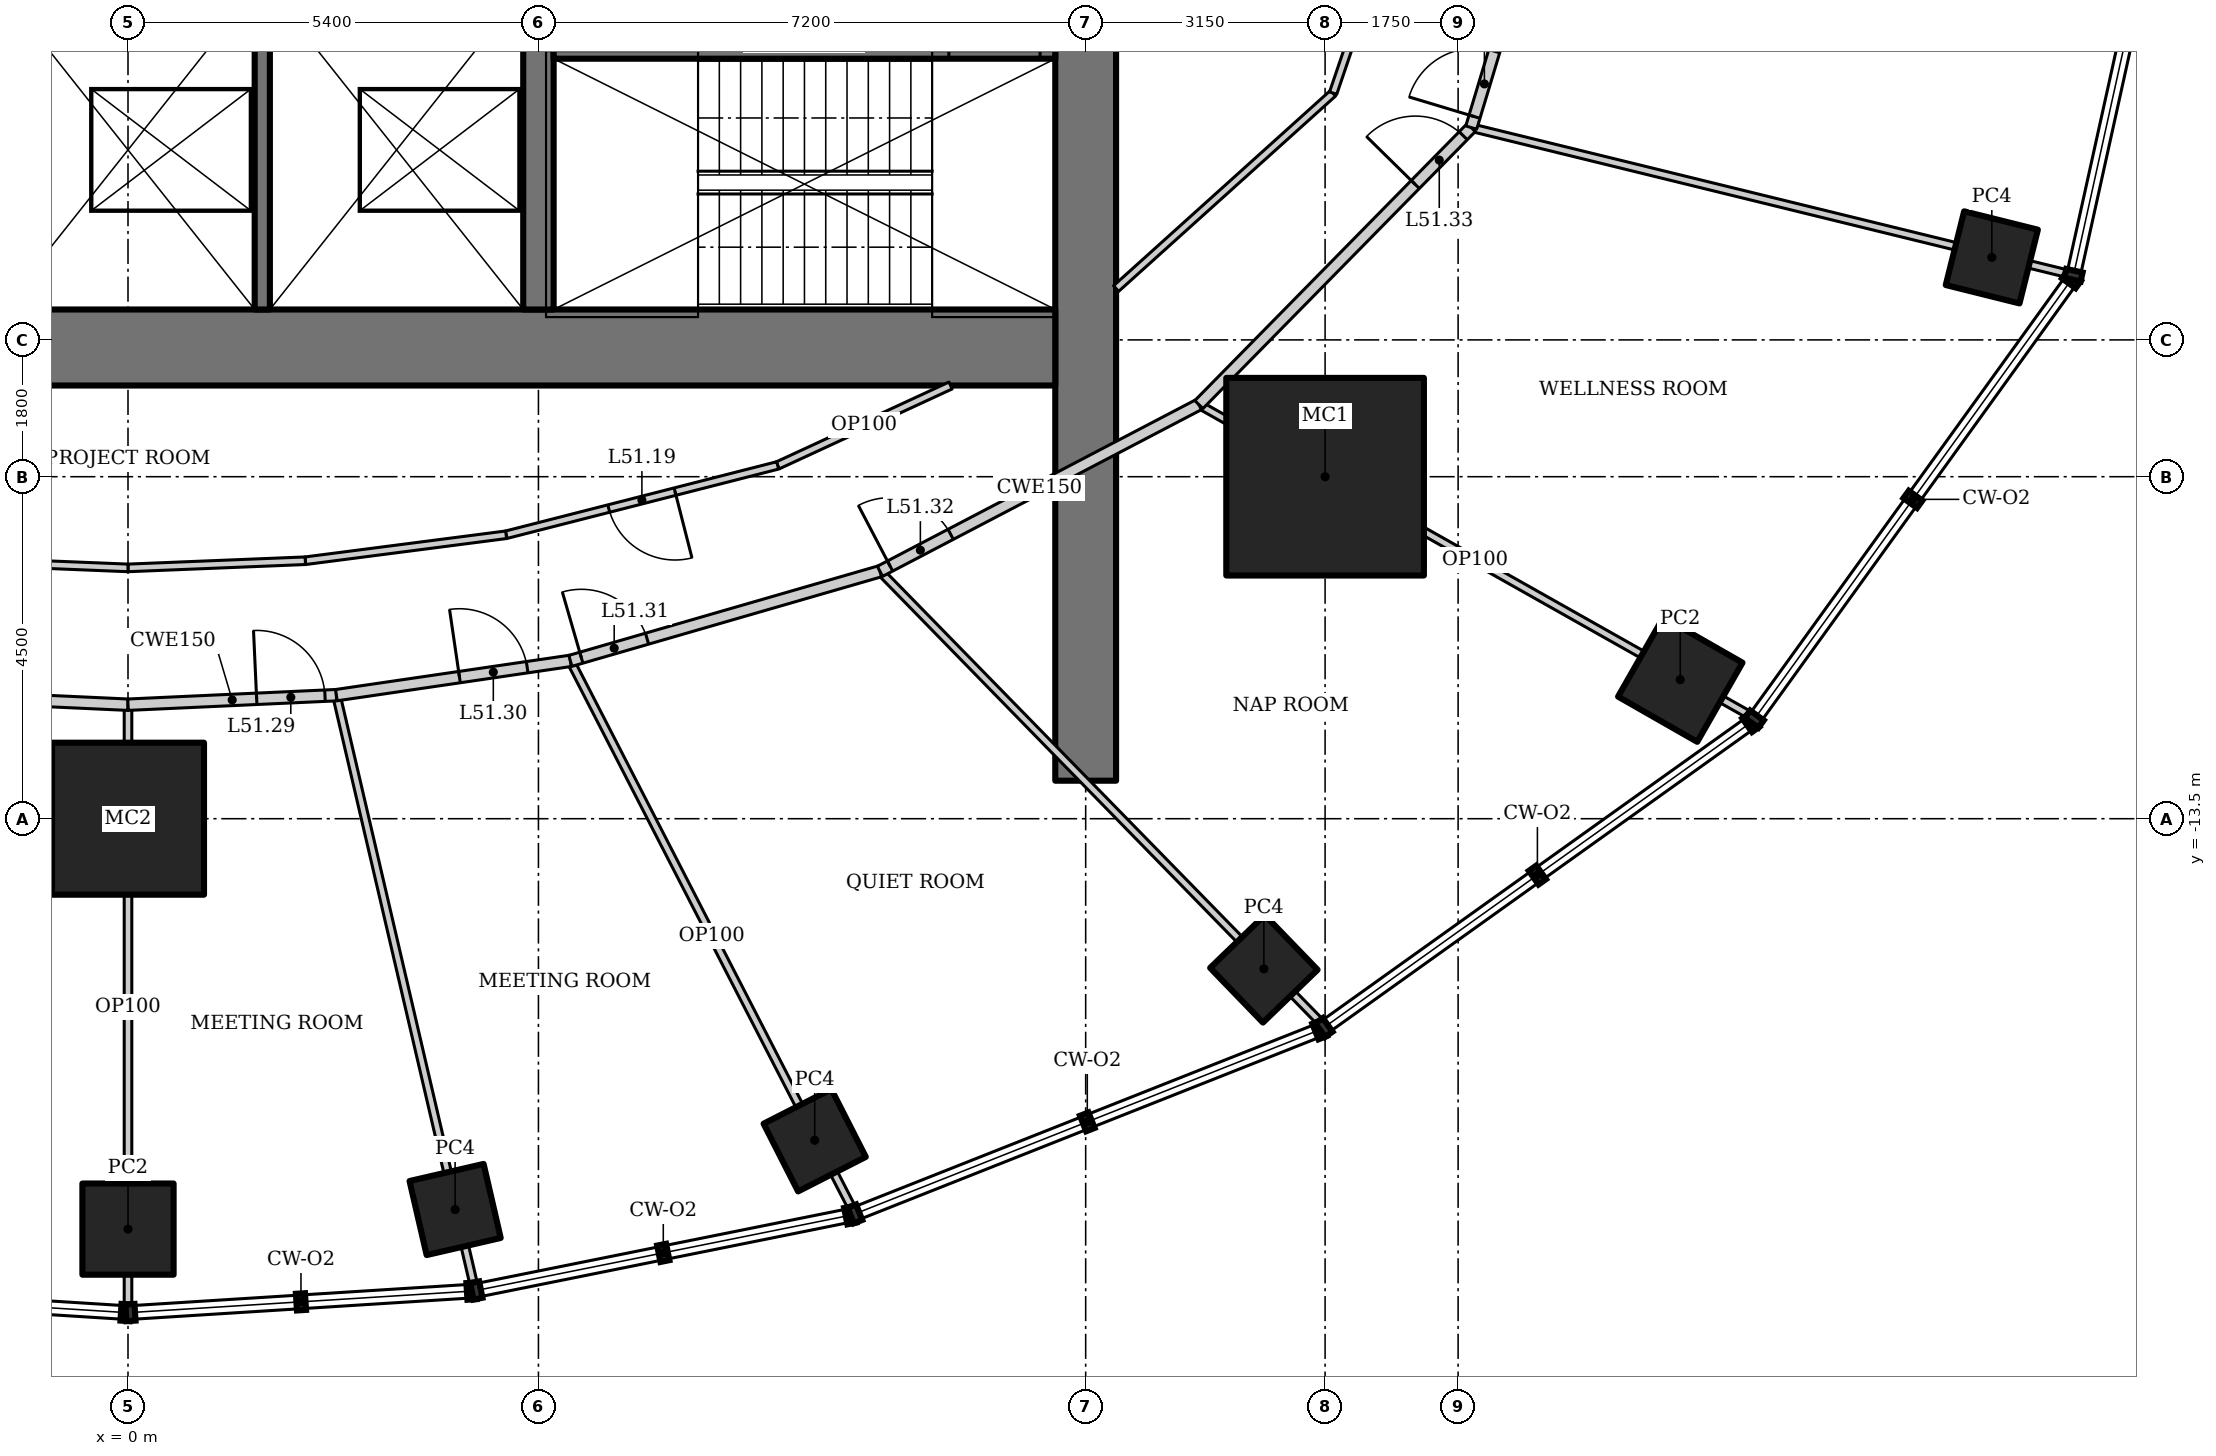
"""IFC4 building model, lengths in metres.
Left out: names, types, materials, properties, quantities, classifications, styles, units other than length and angle.
Written with IfcOpenShell. Run it as: python <this file> out.ifc"""

import sys

from ifc_helpers import new_model, si_unit, direction, frame, frame_2d, origin, origin_2d, place, context, subcontext, project, spatial, rectangle, hollow_rectangle, extrude, element, fill, save


model = new_model("IFC4")
c1 = context("Model", 3, precision=1e-05, world=origin(), true_north=direction((0.0, 1.0)))
c2 = subcontext(c1, "Body", "Model", "MODEL_VIEW")
j1 = project(units=[si_unit("LENGTHUNIT", "METRE"), si_unit("PLANEANGLEUNIT", "RADIAN")], contexts=[c1])
p1 = place(None, origin())
s1 = spatial("IfcSite", under=j1, at=p1, CompositionType="ELEMENT")
p2 = place(p1, origin())
s2 = spatial("IfcBuilding", under=s1, at=p2, CompositionType="ELEMENT")
p3 = place(p2, frame((0.0, 0.0, 220.0)))
s3 = spatial("IfcBuildingStorey", under=s2, at=p3, CompositionType="ELEMENT", Elevation=220.0)
p4 = place(p3, frame((0.0, -13.5, 0.0), z_axis=(0.0, 0.0, 1.0), x_axis=(1.0, 0.0, 0.0)))
e1 = element("IfcColumn", 1, at=p4, inside=s3, PredefinedType="COLUMN", context=c2, shape_type="SweptSolid", body=[
    extrude(hollow_rectangle(XDim=2.0, YDim=2.0, WallThickness=0.17, at=origin_2d()), origin(), (0.0, 0.0, 1.0), 4.2),
])
p5 = place(p3, frame((15.75, -9.0, 0.0), z_axis=(0.0, 0.0, 1.0), x_axis=(1.0, 0.0, 0.0)))
e2 = element("IfcColumn", 2, at=p5, inside=s3, PredefinedType="COLUMN", context=c2, shape_type="SweptSolid", body=[
    extrude(hollow_rectangle(XDim=2.6, YDim=2.6, WallThickness=0.13, at=origin_2d()), origin(), (0.0, 0.0, 1.0), 4.2),
])
p6 = place(p3, frame((0.0, -18.9, 0.0), z_axis=(0.0, 0.0, 1.0), x_axis=(1.0, 0.0, 0.0)))
e3 = element("IfcColumn", 3, at=p6, inside=s3, PredefinedType="COLUMN", context=c2, shape_type="SweptSolid", body=[
    extrude(hollow_rectangle(XDim=1.2, YDim=1.2, WallThickness=0.1, at=origin_2d()), origin(), (0.0, 0.0, 1.0), 4.2),
])
for number, where, z_axis, x_axis in (
    (4, (4.304, -18.642, 0.0), (0.0, 0.0, 1.0), (0.974, 0.225, 0.0)),
    (5, (9.035, -17.731, 0.0), (0.0, 0.0, 1.0), (0.891, 0.454, 0.0)),
    (6, (14.944, -15.475, 0.0), (0.0, 0.0, 1.0), (0.719, 0.695, 0.0)),
):
    element("IfcColumn", number, at=place(p3, frame(where, z_axis=z_axis, x_axis=x_axis)), inside=s3, PredefinedType="COLUMN", context=c2, shape_type="SweptSolid", body=[
        extrude(hollow_rectangle(XDim=1.0, YDim=1.0, WallThickness=0.08, at=origin_2d()), origin(), (0.0, 0.0, 1.0), 4.2),
    ])
p7 = place(p3, frame((20.423, -11.67, 0.0), z_axis=(0.0, 0.0, 1.0), x_axis=(0.496139221777, 0.86824298017, 0.0)))
e7 = element("IfcColumn", 7, at=p7, inside=s3, PredefinedType="COLUMN", context=c2, shape_type="SweptSolid", body=[
    extrude(hollow_rectangle(XDim=1.2, YDim=1.2, WallThickness=0.1, at=origin_2d()), origin(), (0.0, 0.0, 1.0), 4.2),
])
p8 = place(p3, frame((24.522, -6.114, 0.0), z_axis=(0.0, 0.0, 1.0), x_axis=(0.2419218956, 0.970295726276, 0.0)))
e8 = element("IfcColumn", 8, at=p8, inside=s3, PredefinedType="COLUMN", context=c2, shape_type="SweptSolid", body=[
    extrude(hollow_rectangle(XDim=1.0, YDim=1.0, WallThickness=0.08, at=origin_2d()), origin(), (0.0, 0.0, 1.0), 4.2),
])
p9 = place(p3, frame((12.6, -13.0, 0.0), z_axis=(0.0, 0.0, 1.0), x_axis=(0.0, 1.0, 0.0)))
e9 = element("IfcWall", 9, at=p9, inside=s3, PredefinedType="SHEAR", context=c2, shape_type="SweptSolid", body=[
    extrude(rectangle(XDim=26.0, YDim=0.8, at=frame_2d((13.0, 0.0))), origin(), (0.0, 0.0, 1.0), 4.2),
])
p10 = place(p9, frame((12.1, 0.0, 0.0)))
e10 = element("IfcOpeningElement", 10, at=p10, cuts=e9, PredefinedType="OPENING", context=c2, shape_type="SweptSolid", body=[
    extrude(rectangle(XDim=1.8, YDim=2.1, at=frame_2d((0.9, 1.05))), frame((0.0, 0.41, 0.0), z_axis=(0.0, -1.0, 0.0), x_axis=(1.0, 0.0, 0.0)), (0.0, 0.0, 1.0), 0.82),
])
p11 = place(p3, frame((-12.2, -7.3, 0.0), z_axis=(0.0, 0.0, 1.0), x_axis=(1.0, 0.0, 0.0)))
e11 = element("IfcWall", 11, at=p11, inside=s3, PredefinedType="SHEAR", context=c2, shape_type="SweptSolid", body=[
    extrude(rectangle(XDim=24.4, YDim=1.0, at=frame_2d((12.2, 0.0))), origin(), (0.0, 0.0, 1.0), 4.2),
])
p12 = place(p3, frame((5.4, -6.8, 0.0), z_axis=(0.0, 0.0, 1.0), x_axis=(0.0, 1.0, 0.0)))
e12 = element("IfcWall", 12, at=p12, inside=s3, PredefinedType="SHEAR", context=c2, shape_type="SweptSolid", body=[
    extrude(rectangle(XDim=14.6, YDim=0.4, at=frame_2d((7.3, 0.0))), origin(), (0.0, 0.0, 1.0), 4.2),
])
p13 = place(p12, frame((5.9, 0.0, 0.0)))
e13 = element("IfcOpeningElement", 13, at=p13, cuts=e12, PredefinedType="OPENING", context=c2, shape_type="SweptSolid", body=[
    extrude(rectangle(XDim=1.8, YDim=2.1, at=frame_2d((0.9, 1.05))), frame((0.0, 0.21, 0.0), z_axis=(0.0, -1.0, 0.0), x_axis=(1.0, 0.0, 0.0)), (0.0, 0.0, 1.0), 0.42),
])
p14 = place(p3, frame((1.767, -2.6, 0.0), z_axis=(0.0, 0.0, 1.0), x_axis=(0.0, -1.0, 0.0)))
e14 = element("IfcWall", 14, at=p14, inside=s3, PredefinedType="SOLIDWALL", context=c2, shape_type="SweptSolid", body=[
    extrude(rectangle(XDim=4.2, YDim=0.2, at=frame_2d((2.1, 0.0))), origin(), (0.0, 0.0, 1.0), 4.2),
])
p15 = place(p3, frame((5.6, -3.4, 0.0), z_axis=(0.0, 0.0, 1.0), x_axis=(1.0, 0.0, 0.0)))
e15 = element("IfcWall", 15, at=p15, inside=s3, PredefinedType="SHEAR", context=c2, shape_type="SweptSolid", body=[
    extrude(rectangle(XDim=6.6, YDim=0.2, at=frame_2d((3.3, 0.0))), origin(), (0.0, 0.0, 1.0), 4.2),
])
p16 = place(p15, frame((5.2, 0.0, 0.0)))
e16 = element("IfcOpeningElement", 16, at=p16, cuts=e15, PredefinedType="OPENING", context=c2, shape_type="SweptSolid", body=[
    extrude(rectangle(XDim=1.2, YDim=2.1, at=frame_2d((0.6, 1.05))), frame((0.0, 0.11, 0.0), z_axis=(0.0, -1.0, 0.0), x_axis=(1.0, 0.0, 0.0)), (0.0, 0.0, 1.0), 0.22),
])
p17 = place(p3, frame((0.0, -19.945, 0.0), z_axis=(0.0, 0.0, 1.0), x_axis=(0.0, 1.0, 0.0)))
e17 = element("IfcWall", 17, at=p17, inside=s3, PredefinedType="PARTITIONING", context=c2, shape_type="SweptSolid", body=[
    extrude(rectangle(XDim=7.945, YDim=0.1, at=frame_2d((3.972, 0.0))), origin(), (0.0, 0.0, 1.0), 3.644),
])
p18 = place(p3, frame((4.556, -19.657, 0.0), z_axis=(0.0, 0.0, 1.0), x_axis=(-0.227034513848, 0.973886712879, 0.0)))
e18 = element("IfcWall", 18, at=p18, inside=s3, PredefinedType="PARTITIONING", context=c2, shape_type="SweptSolid", body=[
    extrude(rectangle(XDim=7.991, YDim=0.1, at=frame_2d((3.996, 0.0))), origin(), (0.0, 0.0, 1.0), 3.293),
])
p19 = place(p3, frame((9.539, -18.65, 0.0), z_axis=(0.0, 0.0, 1.0), x_axis=(-0.457552286462, 0.88918271753, 0.0)))
e19 = element("IfcWall", 19, at=p19, inside=s3, PredefinedType="PARTITIONING", context=c2, shape_type="SweptSolid", body=[
    extrude(rectangle(XDim=8.128, YDim=0.1, at=frame_2d((4.064, 0.0))), origin(), (0.0, 0.0, 1.0), 3.293),
])
p20 = place(p3, frame((15.709, -16.199, 0.0), z_axis=(0.0, 0.0, 1.0), x_axis=(-0.69875697861, 0.715359129978, 0.0)))
e20 = element("IfcWall", 20, at=p20, inside=s3, PredefinedType="PARTITIONING", context=c2, shape_type="SweptSolid", body=[
    extrude(rectangle(XDim=8.323, YDim=0.1, at=frame_2d((4.162, 0.0))), origin(), (0.0, 0.0, 1.0), 3.41),
])
p21 = place(p3, frame((21.358, -12.15, 0.0), z_axis=(0.0, 0.0, 1.0), x_axis=(-0.871080529249, 0.491140215786, 0.0)))
e21 = element("IfcWall", 21, at=p21, inside=s3, PredefinedType="PARTITIONING", context=c2, shape_type="SweptSolid", body=[
    extrude(rectangle(XDim=8.345, YDim=0.1, at=frame_2d((4.173, 0.0))), origin(), (0.0, 0.0, 1.0), 3.522),
])
p22 = place(p3, frame((25.543, -6.336, 0.0), z_axis=(0.0, 0.0, 1.0), x_axis=(-0.97123661777, 0.238116425942, 0.0)))
e22 = element("IfcWall", 22, at=p22, inside=s3, PredefinedType="PARTITIONING", context=c2, shape_type="SweptSolid", body=[
    extrude(rectangle(XDim=8.103, YDim=0.1, at=frame_2d((4.052, 0.0))), origin(), (0.0, 0.0, 1.0), 3.108),
])
p23 = place(p3, frame((-2.741, -11.875, 0.0), z_axis=(0.0, 0.0, 1.0), x_axis=(0.998953998629, -0.045726454297, 0.0)))
e23 = element("IfcWall", 23, at=p23, inside=s3, PredefinedType="PARTITIONING", context=c2, shape_type="SweptSolid", body=[
    extrude(rectangle(XDim=2.744, YDim=0.15, at=frame_2d((1.372, 0.0))), origin(), (0.0, 0.0, 1.0), 4.05),
])
p24 = place(p3, frame((0.0, -12.0, 0.0), z_axis=(0.0, 0.0, 1.0), x_axis=(0.998953998629, 0.045726454297, 0.0)))
e24 = element("IfcWall", 24, at=p24, inside=s3, PredefinedType="PARTITIONING", context=c2, shape_type="SweptSolid", body=[
    extrude(rectangle(XDim=2.744, YDim=0.15, at=frame_2d((1.372, 0.0))), origin(), (0.0, 0.0, 1.0), 4.05),
])
p25 = place(p24, frame((1.694, 0.0, 0.0)))
e25 = element("IfcOpeningElement", 25, at=p25, cuts=e24, PredefinedType="OPENING", context=c2, shape_type="SweptSolid", body=[
    extrude(rectangle(XDim=0.9, YDim=2.1, at=frame_2d((0.45, 1.05))), frame((0.0, 0.085, 0.0), z_axis=(0.0, -1.0, 0.0), x_axis=(1.0, 0.0, 0.0)), (0.0, 0.0, 1.0), 0.17),
])
p26 = place(p3, frame((2.741, -11.875, 0.0), z_axis=(0.0, 0.0, 1.0), x_axis=(0.989421822189, 0.145067080265, 0.0)))
e26 = element("IfcWall", 26, at=p26, inside=s3, PredefinedType="PARTITIONING", context=c2, shape_type="SweptSolid", body=[
    extrude(rectangle(XDim=3.112, YDim=0.15, at=frame_2d((1.556, 0.0))), origin(), (0.0, 0.0, 1.0), 4.05),
])
p27 = place(p26, frame((1.637, 0.0, 0.0)))
e27 = element("IfcOpeningElement", 27, at=p27, cuts=e26, PredefinedType="OPENING", context=c2, shape_type="SweptSolid", body=[
    extrude(rectangle(XDim=0.9, YDim=2.1, at=frame_2d((0.45, 1.05))), frame((0.0, 0.085, 0.0), z_axis=(0.0, -1.0, 0.0), x_axis=(1.0, 0.0, 0.0)), (0.0, 0.0, 1.0), 0.17),
])
p28 = place(p3, frame((5.82, -11.423, 0.0), z_axis=(0.0, 0.0, 1.0), x_axis=(0.960614838378, 0.27788330696, 0.0)))
e28 = element("IfcWall", 28, at=p28, inside=s3, PredefinedType="PARTITIONING", context=c2, shape_type="SweptSolid", body=[
    extrude(rectangle(XDim=4.24, YDim=0.15, at=frame_2d((2.12, 0.0))), origin(), (0.0, 0.0, 1.0), 4.05),
])
p29 = place(p28, frame((0.15, 0.0, 0.0)))
e29 = element("IfcOpeningElement", 29, at=p29, cuts=e28, PredefinedType="OPENING", context=c2, shape_type="SweptSolid", body=[
    extrude(rectangle(XDim=0.9, YDim=2.1, at=frame_2d((0.45, 1.05))), frame((0.0, 0.085, 0.0), z_axis=(0.0, -1.0, 0.0), x_axis=(1.0, 0.0, 0.0)), (0.0, 0.0, 1.0), 0.17),
])
p30 = place(p3, frame((9.893, -10.245, 0.0), z_axis=(0.0, 0.0, 1.0), x_axis=(0.886174439647, 0.463351769735, 0.0)))
e30 = element("IfcWall", 30, at=p30, inside=s3, PredefinedType="PARTITIONING", context=c2, shape_type="SweptSolid", body=[
    extrude(rectangle(XDim=4.735, YDim=0.15, at=frame_2d((2.367, 0.0))), origin(), (0.0, 0.0, 1.0), 4.05),
])
p31 = place(p30, frame((0.15, 0.0, 0.0)))
e31 = element("IfcOpeningElement", 31, at=p31, cuts=e30, PredefinedType="OPENING", context=c2, shape_type="SweptSolid", body=[
    extrude(rectangle(XDim=0.9, YDim=2.1, at=frame_2d((0.45, 1.05))), frame((0.0, 0.085, 0.0), z_axis=(0.0, -1.0, 0.0), x_axis=(1.0, 0.0, 0.0)), (0.0, 0.0, 1.0), 0.17),
])
p32 = place(p3, frame((14.089, -8.051, 0.0), z_axis=(0.0, 0.0, 1.0), x_axis=(0.701111216625, 0.713051934941, 0.0)))
e32 = element("IfcWall", 32, at=p32, inside=s3, PredefinedType="PARTITIONING", context=c2, shape_type="SweptSolid", body=[
    extrude(rectangle(XDim=5.112, YDim=0.15, at=frame_2d((2.556, 0.0))), origin(), (0.0, 0.0, 1.0), 4.05),
])
p33 = place(p32, frame((4.061, 0.0, 0.0)))
e33 = element("IfcOpeningElement", 33, at=p33, cuts=e32, PredefinedType="OPENING", context=c2, shape_type="SweptSolid", body=[
    extrude(rectangle(XDim=0.9, YDim=2.1, at=frame_2d((0.45, 1.05))), frame((0.0, 0.085, 0.0), z_axis=(0.0, -1.0, 0.0), x_axis=(1.0, 0.0, 0.0)), (0.0, 0.0, 1.0), 0.17),
])
p34 = place(p3, frame((10.823, -7.8, 0.0), z_axis=(0.0, 0.0, 1.0), x_axis=(-0.907759689292, -0.419490579748, 0.0)))
e34 = element("IfcWall", 34, at=p34, inside=s3, PredefinedType="PARTITIONING", context=c2, shape_type="SweptSolid", body=[
    extrude(rectangle(XDim=2.506, YDim=0.1, at=frame_2d((1.253, 0.0))), origin(), (0.0, 0.0, 1.0), 4.05),
])
p35 = place(p3, frame((8.548, -8.851, 0.0), z_axis=(0.0, 0.0, 1.0), x_axis=(-0.968887312542, -0.247502273921, 0.0)))
e35 = element("IfcWall", 35, at=p35, inside=s3, PredefinedType="PARTITIONING", context=c2, shape_type="SweptSolid", body=[
    extrude(rectangle(XDim=3.687, YDim=0.1, at=frame_2d((1.844, 0.0))), origin(), (0.0, 0.0, 1.0), 4.05),
])
p36 = place(p35, frame((1.394, 0.0, 0.0)))
e36 = element("IfcOpeningElement", 36, at=p36, cuts=e35, PredefinedType="OPENING", context=c2, shape_type="SweptSolid", body=[
    extrude(rectangle(XDim=0.9, YDim=2.1, at=frame_2d((0.45, 1.05))), frame((0.0, 0.06, 0.0), z_axis=(0.0, -1.0, 0.0), x_axis=(1.0, 0.0, 0.0)), (0.0, 0.0, 1.0), 0.12),
])
p37 = place(p3, frame((4.975, -9.764, 0.0), z_axis=(0.0, 0.0, 1.0), x_axis=(-0.99173579163, -0.128296997624, 0.0)))
e37 = element("IfcWall", 37, at=p37, inside=s3, PredefinedType="PARTITIONING", context=c2, shape_type="SweptSolid", body=[
    extrude(rectangle(XDim=2.664, YDim=0.1, at=frame_2d((1.332, 0.0))), origin(), (0.0, 0.0, 1.0), 4.05),
])
for number, where, z_axis, x_axis in (
    (38, (2.333, -10.106, 0.0), (0.0, 0.0, 1.0), (-0.999, -0.04, 0.0)),
    (39, (0.0, -10.2, 0.0), (0.0, 0.0, 1.0), (-0.999, 0.04, 0.0)),
):
    element("IfcWall", number, at=place(p3, frame(where, z_axis=z_axis, x_axis=x_axis)), inside=s3, PredefinedType="PARTITIONING", context=c2, shape_type="SweptSolid", body=[
        extrude(rectangle(XDim=2.335, YDim=0.1, at=frame_2d((1.167, 0.0))), origin(), (0.0, 0.0, 1.0), 4.05),
    ])
p38 = place(p3, frame((15.856, -3.953, 0.0), z_axis=(0.0, 0.0, 1.0), x_axis=(-0.743177243228, -0.669094601046, 0.0)))
e40 = element("IfcWall", 40, at=p38, inside=s3, PredefinedType="PARTITIONING", context=c2, shape_type="SweptSolid", body=[
    extrude(rectangle(XDim=3.843, YDim=0.1, at=frame_2d((1.921, 0.0))), origin(), (0.0, 0.0, 1.0), 4.05),
])
p39 = place(p3, frame((17.673, -4.406, 0.0), z_axis=(0.0, 0.0, 1.0), x_axis=(0.288362447016, 0.957521330912, 0.0)))
e41 = element("IfcWall", 41, at=p39, inside=s3, PredefinedType="PARTITIONING", context=c2, shape_type="SweptSolid", body=[
    extrude(rectangle(XDim=2.163, YDim=0.15, at=frame_2d((1.082, 0.0))), origin(), (0.0, 0.0, 1.0), 4.05),
])
p40 = place(p39, frame((0.15, 0.0, 0.0)))
e42 = element("IfcOpeningElement", 42, at=p40, cuts=e41, PredefinedType="OPENING", context=c2, shape_type="SweptSolid", body=[
    extrude(rectangle(XDim=0.9, YDim=2.1, at=frame_2d((0.45, 1.05))), frame((0.0, 0.085, 0.0), z_axis=(0.0, -1.0, 0.0), x_axis=(1.0, 0.0, 0.0)), (0.0, 0.0, 1.0), 0.17),
])
p41 = place(p3, frame((16.249, -2.796, 0.0), z_axis=(0.0, 0.0, 1.0), x_axis=(-0.321913473529, -0.946769093053, 0.0)))
e43 = element("IfcWall", 43, at=p41, inside=s3, PredefinedType="PARTITIONING", context=c2, shape_type="SweptSolid", body=[
    extrude(rectangle(XDim=1.223, YDim=0.1, at=frame_2d((0.611, 0.0))), origin(), (0.0, 0.0, 1.0), 4.05),
])
p42 = place(p16, origin())
e44 = element("IfcDoor", 44, at=p42, inside=s3, OperationType="SINGLE_SWING_RIGHT", PredefinedType="DOOR", context=c2, shape_type="SweptSolid", body=[
    extrude(rectangle(XDim=1.2, YDim=2.1, at=frame_2d((0.6, 1.05))), frame((0.0, 0.025, 0.0), z_axis=(0.0, -1.0, 0.0), x_axis=(1.0, 0.0, 0.0)), (0.0, 0.0, 1.0), 0.05),
])
fill(e16, e44)
p43 = place(p36, origin())
e45 = element("IfcDoor", 45, at=p43, inside=s3, OperationType="SINGLE_SWING_LEFT", PredefinedType="DOOR", context=c2, shape_type="SweptSolid", body=[
    extrude(rectangle(XDim=0.9, YDim=2.1, at=frame_2d((0.45, 1.05))), frame((0.0, 0.025, 0.0), z_axis=(0.0, -1.0, 0.0), x_axis=(1.0, 0.0, 0.0)), (0.0, 0.0, 1.0), 0.05),
])
fill(e36, e45)
p44 = place(p25, origin())
e46 = element("IfcDoor", 46, at=p44, inside=s3, OperationType="SINGLE_SWING_LEFT", PredefinedType="DOOR", context=c2, shape_type="SweptSolid", body=[
    extrude(rectangle(XDim=0.9, YDim=2.1, at=frame_2d((0.45, 1.05))), frame((0.0, 0.025, 0.0), z_axis=(0.0, -1.0, 0.0), x_axis=(1.0, 0.0, 0.0)), (0.0, 0.0, 1.0), 0.05),
])
fill(e25, e46)
p45 = place(p27, origin())
e47 = element("IfcDoor", 47, at=p45, inside=s3, OperationType="SINGLE_SWING_LEFT", PredefinedType="DOOR", context=c2, shape_type="SweptSolid", body=[
    extrude(rectangle(XDim=0.9, YDim=2.1, at=frame_2d((0.45, 1.05))), frame((0.0, 0.025, 0.0), z_axis=(0.0, -1.0, 0.0), x_axis=(1.0, 0.0, 0.0)), (0.0, 0.0, 1.0), 0.05),
])
fill(e27, e47)
p46 = place(p29, origin())
e48 = element("IfcDoor", 48, at=p46, inside=s3, OperationType="SINGLE_SWING_LEFT", PredefinedType="DOOR", context=c2, shape_type="SweptSolid", body=[
    extrude(rectangle(XDim=0.9, YDim=2.1, at=frame_2d((0.45, 1.05))), frame((0.0, 0.025, 0.0), z_axis=(0.0, -1.0, 0.0), x_axis=(1.0, 0.0, 0.0)), (0.0, 0.0, 1.0), 0.05),
])
fill(e29, e48)
p47 = place(p31, origin())
e49 = element("IfcDoor", 49, at=p47, inside=s3, OperationType="SINGLE_SWING_LEFT", PredefinedType="DOOR", context=c2, shape_type="SweptSolid", body=[
    extrude(rectangle(XDim=0.9, YDim=2.1, at=frame_2d((0.45, 1.05))), frame((0.0, 0.025, 0.0), z_axis=(0.0, -1.0, 0.0), x_axis=(1.0, 0.0, 0.0)), (0.0, 0.0, 1.0), 0.05),
])
fill(e31, e49)
p48 = place(p33, origin())
e50 = element("IfcDoor", 50, at=p48, inside=s3, OperationType="SINGLE_SWING_LEFT", PredefinedType="DOOR", context=c2, shape_type="SweptSolid", body=[
    extrude(rectangle(XDim=0.9, YDim=2.1, at=frame_2d((0.45, 1.05))), frame((0.0, 0.025, 0.0), z_axis=(0.0, -1.0, 0.0), x_axis=(1.0, 0.0, 0.0)), (0.0, 0.0, 1.0), 0.05),
])
fill(e33, e50)
p49 = place(p40, origin())
e51 = element("IfcDoor", 51, at=p49, inside=s3, OperationType="SINGLE_SWING_LEFT", PredefinedType="DOOR", context=c2, shape_type="SweptSolid", body=[
    extrude(rectangle(XDim=0.9, YDim=2.1, at=frame_2d((0.45, 1.05))), frame((0.0, 0.025, 0.0), z_axis=(0.0, -1.0, 0.0), x_axis=(1.0, 0.0, 0.0)), (0.0, 0.0, 1.0), 0.05),
])
fill(e42, e51)
save(model, sys.argv[1])
